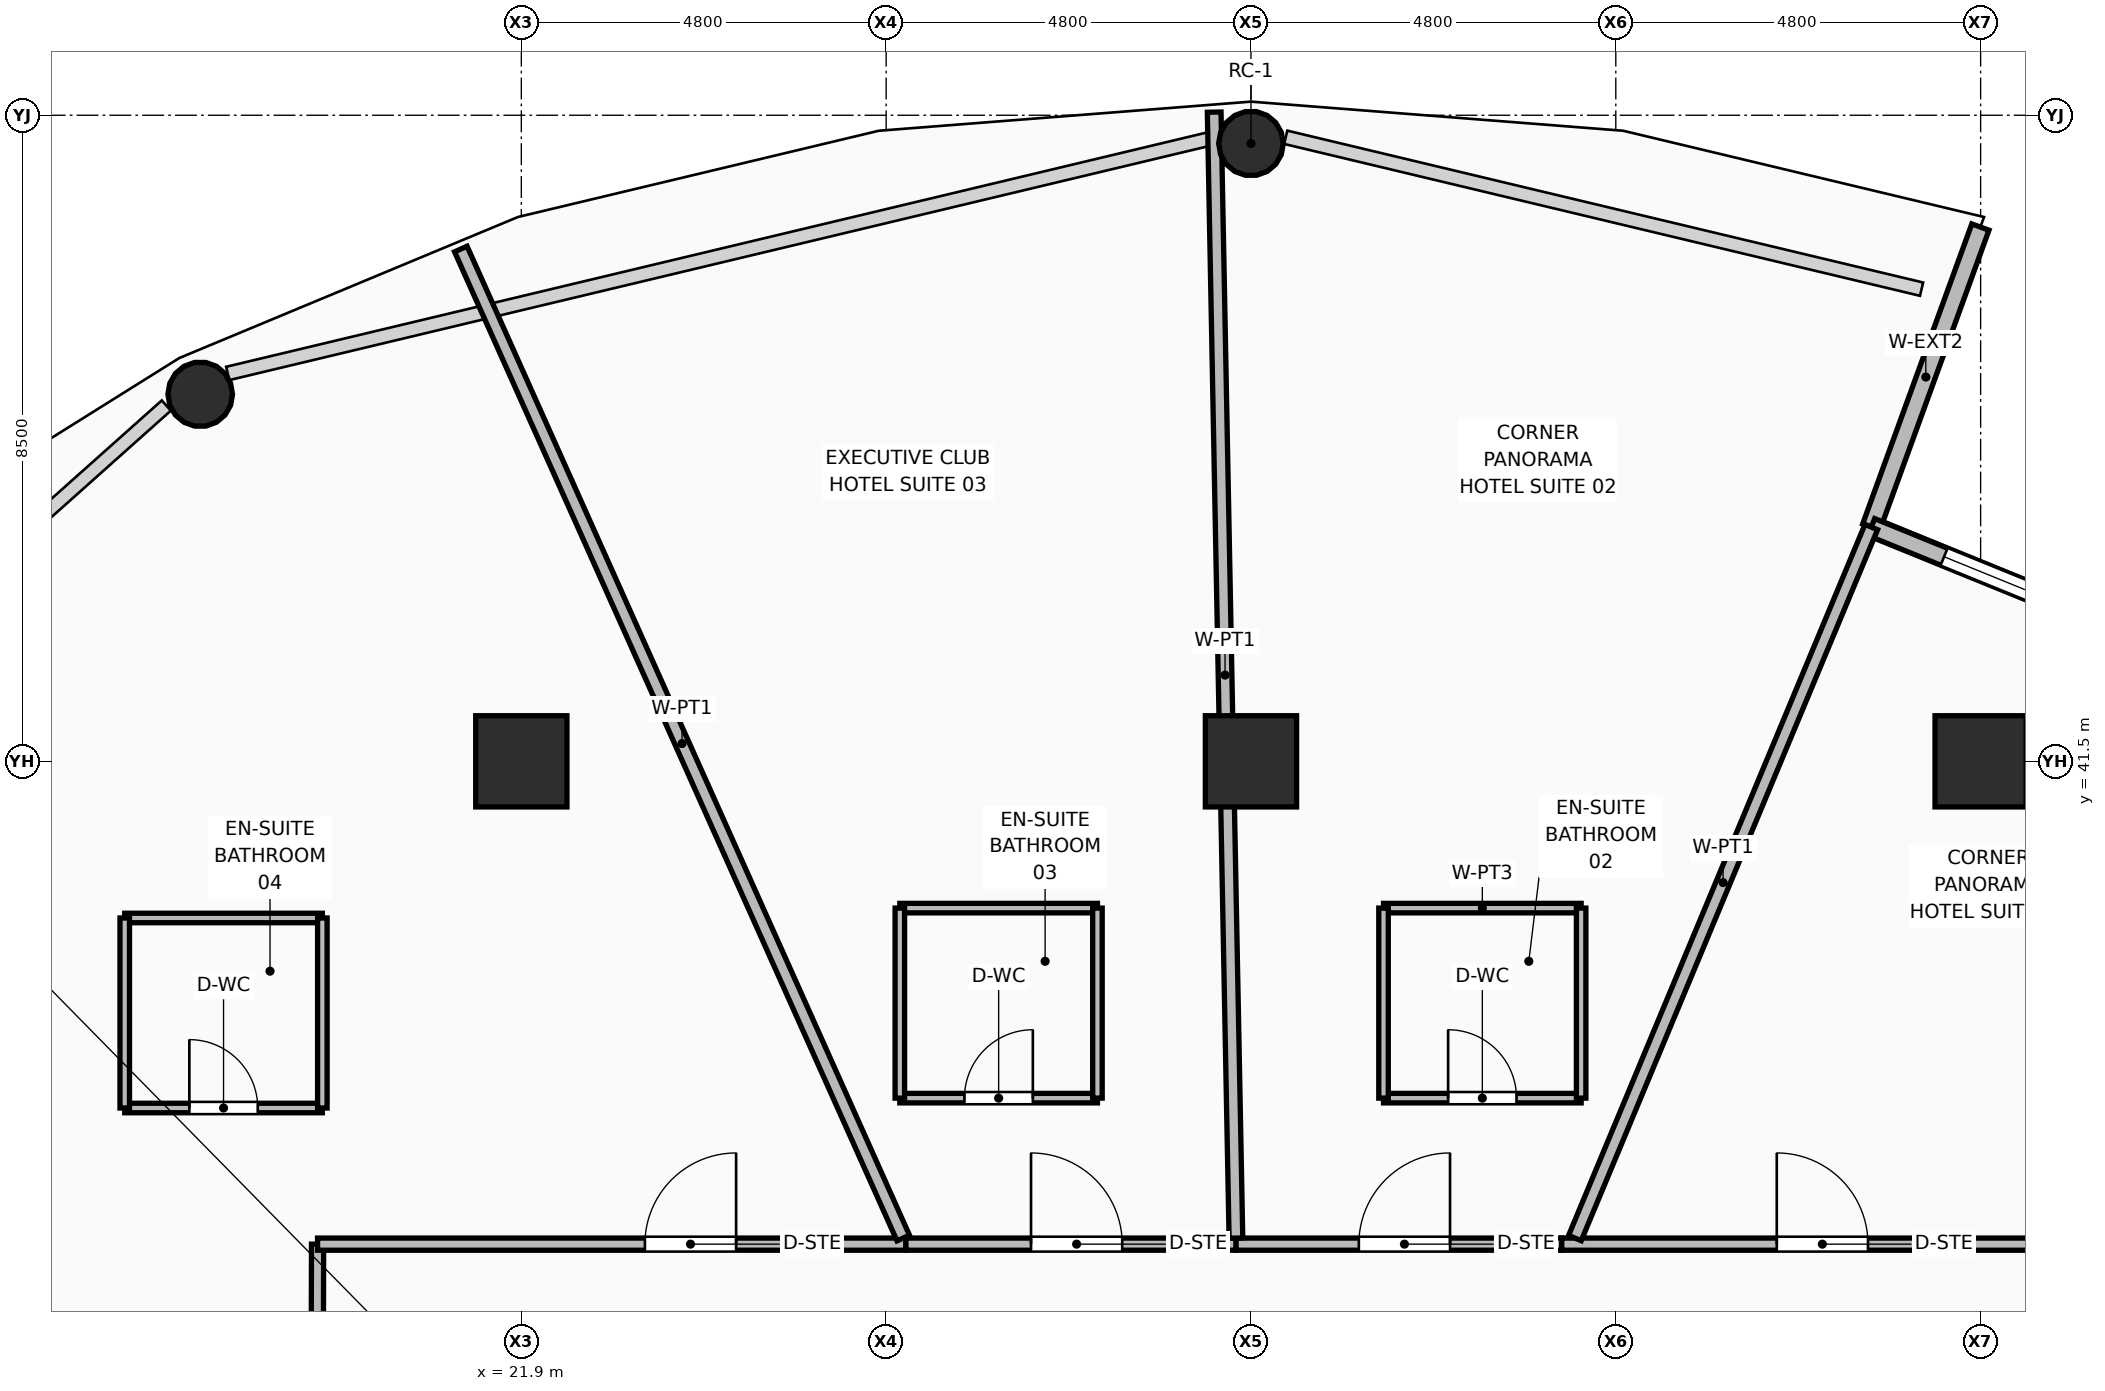
"""IFC4 building model, lengths in metres.
Left out: names, types, materials, properties, quantities, classifications, styles, units other than length and angle.
Written with IfcOpenShell. Run it as: python <this file> out.ifc"""

import sys

from ifc_helpers import new_model, si_unit, direction, frame, frame_2d, origin, origin_2d, place, context, subcontext, project, spatial, rectangle, hollow_rectangle, hollow_circle, extrude, element, fill, save


model = new_model("IFC4")
c1 = context("Model", 3, precision=1e-05, world=origin(), true_north=direction((0.0, 1.0)))
c2 = subcontext(c1, "Body", "Model", "MODEL_VIEW")
j1 = project(units=[si_unit("LENGTHUNIT", "METRE"), si_unit("PLANEANGLEUNIT", "RADIAN")], contexts=[c1])
p1 = place(None, origin())
s1 = spatial("IfcSite", under=j1, at=p1, CompositionType="ELEMENT")
p2 = place(p1, origin())
s2 = spatial("IfcBuilding", under=s1, at=p2, CompositionType="ELEMENT")
p3 = place(p2, frame((0.0, 0.0, 75.75)))
s3 = spatial("IfcBuildingStorey", under=s2, at=p3, CompositionType="ELEMENT", Elevation=75.75)
for number, where, z_axis, x_axis in (
    (1, (21.9, 41.5, 0.0), (0.0, 0.0, 1.0), (1.0, 0.0, 0.0)),
    (2, (31.5, 41.5, 0.0), (0.0, 0.0, 1.0), (1.0, 0.0, 0.0)),
    (3, (41.1, 41.5, 0.0), (0.0, 0.0, 1.0), (1.0, 0.0, 0.0)),
):
    element("IfcColumn", number, at=place(p3, frame(where, z_axis=z_axis, x_axis=x_axis)), inside=s3, PredefinedType="COLUMN", context=c2, shape_type="SweptSolid", body=[
        extrude(hollow_rectangle(XDim=1.2, YDim=1.2, WallThickness=0.045, at=origin_2d()), origin(), (0.0, 0.0, 1.0), 3.75),
    ])
p4 = place(p3, frame((31.5, 49.629, 0.0), z_axis=(0.0, -0.037448923039, 0.999298543061), x_axis=(1.0, 0.0, 0.0)))
e4 = element("IfcColumn", 4, at=p4, inside=s3, PredefinedType="COLUMN", context=c2, shape_type="SweptSolid", body=[
    extrude(hollow_circle(Radius=0.425, WallThickness=0.04, at=origin_2d()), origin(), (0.0, 0.0, 1.0), 3.573),
])
p5 = place(p3, frame((17.675, 46.329, 0.0), z_axis=(0.020978592197, -0.032527068032, 0.999250663505), x_axis=(0.840374471714, 0.542006224404, 0.0)))
e5 = element("IfcColumn", 5, at=p5, inside=s3, PredefinedType="COLUMN", context=c2, shape_type="SweptSolid", body=[
    extrude(hollow_circle(Radius=0.425, WallThickness=0.04, at=origin_2d()), origin(), (0.0, 0.0, 1.0), 3.573),
])
p6 = place(p3, frame((39.661, 44.582, 0.0), z_axis=(0.0, 0.0, 1.0), x_axis=(0.341901740091, 0.939735707592, 0.0)))
e6 = element("IfcWall", 6, at=p6, inside=s3, PredefinedType="SOLIDWALL", context=c2, shape_type="SweptSolid", body=[
    extrude(rectangle(XDim=4.2, YDim=0.24, at=frame_2d((2.1, 0.0))), origin(), (0.0, 0.0, 1.0), 3.57),
])
p7 = place(p3, frame((43.43, 43.047, 0.0), z_axis=(0.0, 0.0, 1.0), x_axis=(-0.926145919151, 0.377165396664, 0.0)))
e7 = element("IfcWall", 7, at=p7, inside=s3, PredefinedType="SOLIDWALL", context=c2, shape_type="SweptSolid", body=[
    extrude(rectangle(XDim=4.07, YDim=0.24, at=frame_2d((2.035, 0.0))), origin(), (0.0, 0.0, 1.0), 3.57),
])
p8 = place(p7, frame((1.035, 0.0, 0.85)))
e8 = element("IfcOpeningElement", 8, at=p8, cuts=e7, PredefinedType="OPENING", context=c2, shape_type="SweptSolid", body=[
    extrude(rectangle(XDim=2.0, YDim=2.4, at=frame_2d((1.0, 1.2))), frame((0.0, 0.13, 0.0), z_axis=(0.0, -1.0, 0.0), x_axis=(1.0, 0.0, 0.0)), (0.0, 0.0, 1.0), 0.26),
])
p9 = place(p3, frame((19.208, 30.415, 0.0), z_axis=(0.0, 0.0, 1.0), x_axis=(0.002321256513, 0.99999730588, 0.0)))
e9 = element("IfcWall", 9, at=p9, inside=s3, PredefinedType="PARTITIONING", context=c2, shape_type="SweptSolid", body=[
    extrude(rectangle(XDim=4.733, YDim=0.16, at=frame_2d((2.366, 0.0))), origin(), (0.0, 0.0, 1.0), 2.928),
])
p10 = place(p3, frame((19.219, 35.148, 0.0), z_axis=(0.0, 0.0, 1.0), x_axis=(1.0, 0.0, 0.0)))
e10 = element("IfcWall", 10, at=p10, inside=s3, PredefinedType="PARTITIONING", context=c2, shape_type="SweptSolid", body=[
    extrude(rectangle(XDim=7.741, YDim=0.16, at=frame_2d((3.871, 0.0))), origin(), (0.0, 0.0, 1.0), 2.928),
])
p11 = place(p10, frame((4.307, 0.0, 0.0)))
e11 = element("IfcOpeningElement", 11, at=p11, cuts=e10, PredefinedType="OPENING", context=c2, shape_type="SweptSolid", body=[
    extrude(rectangle(XDim=1.2, YDim=2.1, at=frame_2d((0.6, 1.05))), frame((0.0, 0.09, 0.0), z_axis=(0.0, -1.0, 0.0), x_axis=(1.0, 0.0, 0.0)), (0.0, 0.0, 1.0), 0.18),
])
p12 = place(p3, frame((26.96, 35.148, 0.0), z_axis=(0.0, 0.0, 1.0), x_axis=(1.0, 0.0, 0.0)))
e12 = element("IfcWall", 12, at=p12, inside=s3, PredefinedType="PARTITIONING", context=c2, shape_type="SweptSolid", body=[
    extrude(rectangle(XDim=4.344, YDim=0.16, at=frame_2d((2.172, 0.0))), origin(), (0.0, 0.0, 1.0), 2.928),
])
p13 = place(p12, frame((1.646, 0.0, 0.0)))
e13 = element("IfcOpeningElement", 13, at=p13, cuts=e12, PredefinedType="OPENING", context=c2, shape_type="SweptSolid", body=[
    extrude(rectangle(XDim=1.2, YDim=2.1, at=frame_2d((0.6, 1.05))), frame((0.0, 0.09, 0.0), z_axis=(0.0, -1.0, 0.0), x_axis=(1.0, 0.0, 0.0)), (0.0, 0.0, 1.0), 0.18),
])
p14 = place(p3, frame((31.304, 35.148, 0.0), z_axis=(0.0, 0.0, 1.0), x_axis=(1.0, 0.0, 0.0)))
e14 = element("IfcWall", 14, at=p14, inside=s3, PredefinedType="PARTITIONING", context=c2, shape_type="SweptSolid", body=[
    extrude(rectangle(XDim=4.285, YDim=0.16, at=frame_2d((2.143, 0.0))), origin(), (0.0, 0.0, 1.0), 2.928),
])
p15 = place(p14, frame((1.615, 0.0, 0.0)))
e15 = element("IfcOpeningElement", 15, at=p15, cuts=e14, PredefinedType="OPENING", context=c2, shape_type="SweptSolid", body=[
    extrude(rectangle(XDim=1.2, YDim=2.1, at=frame_2d((0.6, 1.05))), frame((0.0, 0.09, 0.0), z_axis=(0.0, -1.0, 0.0), x_axis=(1.0, 0.0, 0.0)), (0.0, 0.0, 1.0), 0.18),
])
p16 = place(p3, frame((35.589, 35.148, 0.0), z_axis=(0.0, 0.0, 1.0), x_axis=(1.0, 0.0, 0.0)))
e16 = element("IfcWall", 16, at=p16, inside=s3, PredefinedType="PARTITIONING", context=c2, shape_type="SweptSolid", body=[
    extrude(rectangle(XDim=8.192, YDim=0.16, at=frame_2d((4.096, 0.0))), origin(), (0.0, 0.0, 1.0), 2.928),
])
p17 = place(p16, frame((2.829, 0.0, 0.0)))
e17 = element("IfcOpeningElement", 17, at=p17, cuts=e16, PredefinedType="OPENING", context=c2, shape_type="SweptSolid", body=[
    extrude(rectangle(XDim=1.2, YDim=2.1, at=frame_2d((0.6, 1.05))), frame((0.0, 0.09, 0.0), z_axis=(0.0, -1.0, 0.0), x_axis=(1.0, 0.0, 0.0)), (0.0, 0.0, 1.0), 0.18),
])
p18 = place(p3, frame((35.762, 35.228, 0.0), z_axis=(0.0, 0.0, 1.0), x_axis=(0.384735124205, 0.923027022466, 0.0)))
e18 = element("IfcWall", 18, at=p18, inside=s3, PredefinedType="PARTITIONING", context=c2, shape_type="SweptSolid", body=[
    extrude(rectangle(XDim=10.134, YDim=0.18, at=frame_2d((5.067, 0.0))), origin(), (0.0, 0.0, 1.0), 3.55),
])
p19 = place(p3, frame((31.302, 35.228, 0.0), z_axis=(0.0, 0.0, 1.0), x_axis=(-0.019296271402, 0.999813809622, 0.0)))
e19 = element("IfcWall", 19, at=p19, inside=s3, PredefinedType="PARTITIONING", context=c2, shape_type="SweptSolid", body=[
    extrude(rectangle(XDim=14.816, YDim=0.18, at=frame_2d((7.408, 0.0))), origin(), (0.0, 0.0, 1.0), 2.775),
])
p20 = place(p3, frame((26.925, 35.228, 0.0), z_axis=(0.0, 0.0, 1.0), x_axis=(-0.4083604268, 0.912820772016, 0.0)))
e20 = element("IfcWall", 20, at=p20, inside=s3, PredefinedType="PARTITIONING", context=c2, shape_type="SweptSolid", body=[
    extrude(rectangle(XDim=14.255, YDim=0.18, at=frame_2d((7.127, 0.0))), origin(), (0.0, 0.0, 1.0), 2.775),
])
p21 = place(p3, frame((19.123, 30.453, 0.0), z_axis=(0.0, 0.0, 1.0), x_axis=(-0.915167724462, 0.403073239131, 0.0)))
e21 = element("IfcWall", 21, at=p21, inside=s3, PredefinedType="PARTITIONING", context=c2, shape_type="SweptSolid", body=[
    extrude(rectangle(XDim=13.911, YDim=0.18, at=frame_2d((6.956, 0.0))), origin(), (0.0, 0.0, 1.0), 2.775),
])
p22 = place(p3, frame((33.244, 37.069, 0.0), z_axis=(0.0, 0.0, 1.0), x_axis=(1.0, 0.0, 0.0)))
e22 = element("IfcWall", 22, at=p22, inside=s3, PredefinedType="PARTITIONING", context=c2, shape_type="SweptSolid", body=[
    extrude(rectangle(XDim=2.6, YDim=0.125, at=frame_2d((1.3, 0.0))), origin(), (0.0, 0.0, 1.0), 3.55),
])
p23 = place(p22, frame((0.85, 0.0, 0.0)))
e23 = element("IfcOpeningElement", 23, at=p23, cuts=e22, PredefinedType="OPENING", context=c2, shape_type="SweptSolid", body=[
    extrude(rectangle(XDim=0.9, YDim=2.1, at=frame_2d((0.45, 1.05))), frame((0.0, 0.073, 0.0), z_axis=(0.0, -1.0, 0.0), x_axis=(1.0, 0.0, 0.0)), (0.0, 0.0, 1.0), 0.145),
])
p24 = place(p3, frame((33.244, 39.569, 0.0), z_axis=(0.0, 0.0, 1.0), x_axis=(1.0, 0.0, 0.0)))
e24 = element("IfcWall", 24, at=p24, inside=s3, PredefinedType="PARTITIONING", context=c2, shape_type="SweptSolid", body=[
    extrude(rectangle(XDim=2.6, YDim=0.125, at=frame_2d((1.3, 0.0))), origin(), (0.0, 0.0, 1.0), 3.55),
])
for number, where, z_axis, x_axis in (
    (25, (33.244, 37.069, 0.0), (0.0, 0.0, 1.0), (0.0, 1.0, 0.0)),
    (26, (35.844, 37.069, 0.0), (0.0, 0.0, 1.0), (0.0, 1.0, 0.0)),
):
    element("IfcWall", number, at=place(p3, frame(where, z_axis=z_axis, x_axis=x_axis)), inside=s3, PredefinedType="PARTITIONING", context=c2, shape_type="SweptSolid", body=[
        extrude(rectangle(XDim=2.5, YDim=0.125, at=frame_2d((1.25, 0.0))), origin(), (0.0, 0.0, 1.0), 3.55),
    ])
p25 = place(p3, frame((26.88, 37.069, 0.0), z_axis=(0.0, 0.0, 1.0), x_axis=(1.0, 0.0, 0.0)))
e27 = element("IfcWall", 27, at=p25, inside=s3, PredefinedType="PARTITIONING", context=c2, shape_type="SweptSolid", body=[
    extrude(rectangle(XDim=2.6, YDim=0.125, at=frame_2d((1.3, 0.0))), origin(), (0.0, 0.0, 1.0), 3.55),
])
p26 = place(p25, frame((0.85, 0.0, 0.0)))
e28 = element("IfcOpeningElement", 28, at=p26, cuts=e27, PredefinedType="OPENING", context=c2, shape_type="SweptSolid", body=[
    extrude(rectangle(XDim=0.9, YDim=2.1, at=frame_2d((0.45, 1.05))), frame((0.0, 0.073, 0.0), z_axis=(0.0, -1.0, 0.0), x_axis=(1.0, 0.0, 0.0)), (0.0, 0.0, 1.0), 0.145),
])
p27 = place(p3, frame((26.88, 39.569, 0.0), z_axis=(0.0, 0.0, 1.0), x_axis=(1.0, 0.0, 0.0)))
e29 = element("IfcWall", 29, at=p27, inside=s3, PredefinedType="PARTITIONING", context=c2, shape_type="SweptSolid", body=[
    extrude(rectangle(XDim=2.6, YDim=0.125, at=frame_2d((1.3, 0.0))), origin(), (0.0, 0.0, 1.0), 3.55),
])
for number, where, z_axis, x_axis in (
    (30, (26.88, 37.069, 0.0), (0.0, 0.0, 1.0), (0.0, 1.0, 0.0)),
    (31, (29.48, 37.069, 0.0), (0.0, 0.0, 1.0), (0.0, 1.0, 0.0)),
):
    element("IfcWall", number, at=place(p3, frame(where, z_axis=z_axis, x_axis=x_axis)), inside=s3, PredefinedType="PARTITIONING", context=c2, shape_type="SweptSolid", body=[
        extrude(rectangle(XDim=2.5, YDim=0.125, at=frame_2d((1.25, 0.0))), origin(), (0.0, 0.0, 1.0), 3.55),
    ])
p28 = place(p3, frame((16.682, 36.939, 0.0), z_axis=(0.0, 0.0, 1.0), x_axis=(1.0, 0.0, 0.0)))
e32 = element("IfcWall", 32, at=p28, inside=s3, PredefinedType="PARTITIONING", context=c2, shape_type="SweptSolid", body=[
    extrude(rectangle(XDim=2.6, YDim=0.125, at=frame_2d((1.3, 0.0))), origin(), (0.0, 0.0, 1.0), 3.55),
])
p29 = place(p28, frame((0.85, 0.0, 0.0)))
e33 = element("IfcOpeningElement", 33, at=p29, cuts=e32, PredefinedType="OPENING", context=c2, shape_type="SweptSolid", body=[
    extrude(rectangle(XDim=0.9, YDim=2.1, at=frame_2d((0.45, 1.05))), frame((0.0, 0.073, 0.0), z_axis=(0.0, -1.0, 0.0), x_axis=(1.0, 0.0, 0.0)), (0.0, 0.0, 1.0), 0.145),
])
p30 = place(p3, frame((16.682, 39.439, 0.0), z_axis=(0.0, 0.0, 1.0), x_axis=(1.0, 0.0, 0.0)))
e34 = element("IfcWall", 34, at=p30, inside=s3, PredefinedType="PARTITIONING", context=c2, shape_type="SweptSolid", body=[
    extrude(rectangle(XDim=2.6, YDim=0.125, at=frame_2d((1.3, 0.0))), origin(), (0.0, 0.0, 1.0), 3.55),
])
for number, where, z_axis, x_axis in (
    (35, (16.682, 36.939, 0.0), (0.0, 0.0, 1.0), (0.0, 1.0, 0.0)),
    (36, (19.282, 36.939, 0.0), (0.0, 0.0, 1.0), (0.0, 1.0, 0.0)),
):
    element("IfcWall", number, at=place(p3, frame(where, z_axis=z_axis, x_axis=x_axis)), inside=s3, PredefinedType="PARTITIONING", context=c2, shape_type="SweptSolid", body=[
        extrude(rectangle(XDim=2.5, YDim=0.125, at=frame_2d((1.25, 0.0))), origin(), (0.0, 0.0, 1.0), 3.55),
    ])
p31 = place(p8, origin())
e37 = element("IfcWindow", 37, at=p31, inside=s3, PartitioningType="SINGLE_PANEL", PredefinedType="WINDOW", context=c2, shape_type="SweptSolid", body=[
    extrude(rectangle(XDim=2.0, YDim=2.4, at=frame_2d((1.0, 1.2))), frame((0.0, 0.03, 0.0), z_axis=(0.0, -1.0, 0.0), x_axis=(1.0, 0.0, 0.0)), (0.0, 0.0, 1.0), 0.06),
])
fill(e8, e37)
p32 = place(p17, origin())
e38 = element("IfcDoor", 38, at=p32, inside=s3, OperationType="SINGLE_SWING_LEFT", PredefinedType="DOOR", context=c2, shape_type="SweptSolid", body=[
    extrude(rectangle(XDim=1.2, YDim=2.1, at=frame_2d((0.6, 1.05))), frame((0.0, 0.025, 0.0), z_axis=(0.0, -1.0, 0.0), x_axis=(1.0, 0.0, 0.0)), (0.0, 0.0, 1.0), 0.05),
])
fill(e17, e38)
p33 = place(p23, origin())
e39 = element("IfcDoor", 39, at=p33, inside=s3, OperationType="SINGLE_SWING_LEFT", PredefinedType="DOOR", context=c2, shape_type="SweptSolid", body=[
    extrude(rectangle(XDim=0.9, YDim=2.1, at=frame_2d((0.45, 1.05))), frame((0.0, 0.025, 0.0), z_axis=(0.0, -1.0, 0.0), x_axis=(1.0, 0.0, 0.0)), (0.0, 0.0, 1.0), 0.05),
])
fill(e23, e39)
p34 = place(p15, origin())
e40 = element("IfcDoor", 40, at=p34, inside=s3, OperationType="SINGLE_SWING_RIGHT", PredefinedType="DOOR", context=c2, shape_type="SweptSolid", body=[
    extrude(rectangle(XDim=1.2, YDim=2.1, at=frame_2d((0.6, 1.05))), frame((0.0, 0.025, 0.0), z_axis=(0.0, -1.0, 0.0), x_axis=(1.0, 0.0, 0.0)), (0.0, 0.0, 1.0), 0.05),
])
fill(e15, e40)
p35 = place(p26, origin())
e41 = element("IfcDoor", 41, at=p35, inside=s3, OperationType="SINGLE_SWING_RIGHT", PredefinedType="DOOR", context=c2, shape_type="SweptSolid", body=[
    extrude(rectangle(XDim=0.9, YDim=2.1, at=frame_2d((0.45, 1.05))), frame((0.0, 0.025, 0.0), z_axis=(0.0, -1.0, 0.0), x_axis=(1.0, 0.0, 0.0)), (0.0, 0.0, 1.0), 0.05),
])
fill(e28, e41)
p36 = place(p13, origin())
e42 = element("IfcDoor", 42, at=p36, inside=s3, OperationType="SINGLE_SWING_LEFT", PredefinedType="DOOR", context=c2, shape_type="SweptSolid", body=[
    extrude(rectangle(XDim=1.2, YDim=2.1, at=frame_2d((0.6, 1.05))), frame((0.0, 0.025, 0.0), z_axis=(0.0, -1.0, 0.0), x_axis=(1.0, 0.0, 0.0)), (0.0, 0.0, 1.0), 0.05),
])
fill(e13, e42)
p37 = place(p29, origin())
e43 = element("IfcDoor", 43, at=p37, inside=s3, OperationType="SINGLE_SWING_LEFT", PredefinedType="DOOR", context=c2, shape_type="SweptSolid", body=[
    extrude(rectangle(XDim=0.9, YDim=2.1, at=frame_2d((0.45, 1.05))), frame((0.0, 0.025, 0.0), z_axis=(0.0, -1.0, 0.0), x_axis=(1.0, 0.0, 0.0)), (0.0, 0.0, 1.0), 0.05),
])
fill(e33, e43)
p38 = place(p11, origin())
e44 = element("IfcDoor", 44, at=p38, inside=s3, OperationType="SINGLE_SWING_RIGHT", PredefinedType="DOOR", context=c2, shape_type="SweptSolid", body=[
    extrude(rectangle(XDim=1.2, YDim=2.1, at=frame_2d((0.6, 1.05))), frame((0.0, 0.025, 0.0), z_axis=(0.0, -1.0, 0.0), x_axis=(1.0, 0.0, 0.0)), (0.0, 0.0, 1.0), 0.05),
])
fill(e11, e44)
save(model, sys.argv[1])
